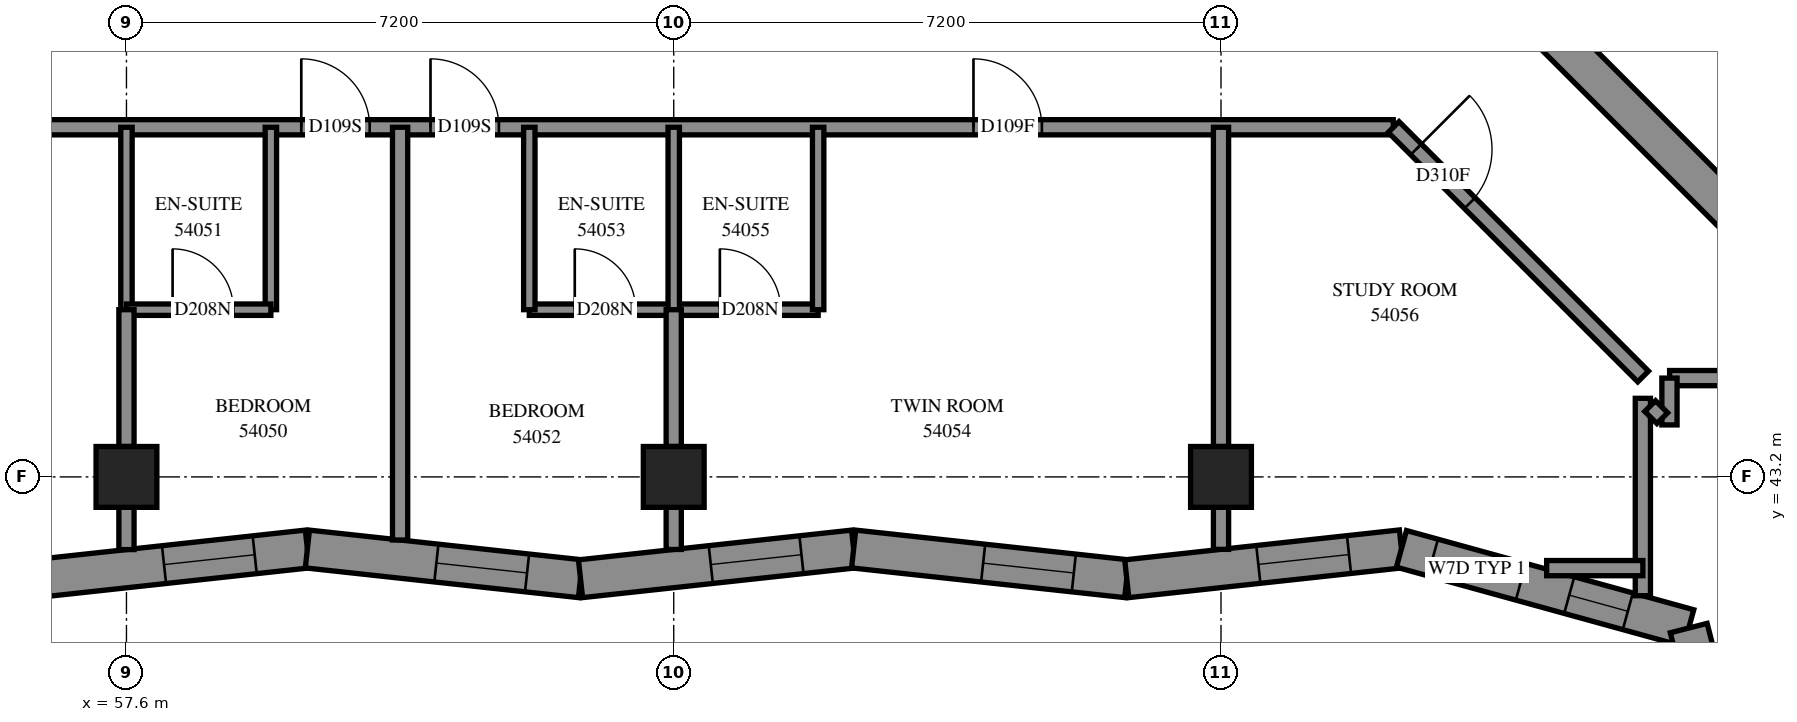
"""IFC4 building model, lengths in metres.
Left out: names, types, materials, properties, quantities, classifications, styles, units other than length and angle.
Written with IfcOpenShell. Run it as: python <this file> out.ifc"""

import sys

from ifc_helpers import new_model, si_unit, direction, frame, frame_2d, origin, origin_2d, place, context, subcontext, project, spatial, polyline, rectangle, outline, extrude, element, fill, save


model = new_model("IFC4")
c1 = context("Model", 3, precision=1e-05, world=origin(), true_north=direction((0.0, 1.0)))
c2 = subcontext(c1, "Body", "Model", "MODEL_VIEW")
j1 = project(units=[si_unit("LENGTHUNIT", "METRE"), si_unit("PLANEANGLEUNIT", "RADIAN")], contexts=[c1])
p1 = place(None, origin())
s1 = spatial("IfcSite", under=j1, at=p1, CompositionType="ELEMENT")
p2 = place(p1, origin())
s2 = spatial("IfcBuilding", under=s1, at=p2, CompositionType="ELEMENT")
p3 = place(p2, frame((0.0, 0.0, 199.8)))
s3 = spatial("IfcBuildingStorey", under=s2, at=p3, CompositionType="ELEMENT", Elevation=199.8)
for number, where, z_axis, x_axis in (
    (1, (57.6, 43.2, 0.0), (0.0, 0.0, 1.0), (1.0, 0.0, 0.0)),
    (2, (64.8, 43.2, 0.0), (0.0, 0.0, 1.0), (1.0, 0.0, 0.0)),
    (3, (72.0, 43.2, 0.0), (0.0, 0.0, 1.0), (1.0, 0.0, 0.0)),
):
    element("IfcColumn", number, at=place(p3, frame(where, z_axis=z_axis, x_axis=x_axis)), inside=s3, PredefinedType="COLUMN", context=c2, shape_type="SweptSolid", body=[
        extrude(rectangle(XDim=0.8, YDim=0.8, at=origin_2d()), origin(), (0.0, 0.0, 1.0), 3.1),
    ])
p4 = place(p3, frame((76.124, 49.267, -0.3), z_axis=(0.0, 0.0, 1.0), x_axis=(0.7071067812, -0.7071067812, 0.0)))
e4 = element("IfcWall", 4, at=p4, inside=s3, PredefinedType="SHEAR", context=c2, shape_type="SweptSolid", body=[
    extrude(rectangle(XDim=15.4, YDim=0.5, at=frame_2d((7.7, 0.0))), origin(), (0.0, 0.0, 1.0), 2.7),
])
p5 = place(p3, frame((56.387, 41.861, 0.0), z_axis=(0.0, 0.0, 1.0), x_axis=(0.994132181, 0.1081721163, 0.0)))
e5 = element("IfcWall", 5, at=p5, inside=s3, PredefinedType="SOLIDWALL", context=c2, shape_type="SweptSolid", body=[
    extrude(outline(polyline([(-0.027, -0.25), (3.587, -0.25), (3.642, 0.25), (0.027, 0.25), (-0.027, -0.25)])), origin(), (0.0, 0.0, 1.0), 3.1),
])
p6 = place(p5, frame((1.718, 0.0, 0.45)))
e6 = element("IfcOpeningElement", 6, at=p6, cuts=e5, PredefinedType="OPENING", context=c2, shape_type="SweptSolid", body=[
    extrude(rectangle(XDim=1.2, YDim=2.5, at=frame_2d((0.6, 1.25))), frame((0.0, 0.26, 0.0), z_axis=(0.0, -1.0, 0.0), x_axis=(1.0, 0.0, 0.0)), (0.0, 0.0, 1.0), 0.52),
])
p7 = place(p3, frame((59.98, 42.252, 0.0), z_axis=(0.0, 0.0, 1.0), x_axis=(0.994132181, -0.1081721163, 0.0)))
e7 = element("IfcWall", 7, at=p7, inside=s3, PredefinedType="SOLIDWALL", context=c2, shape_type="SweptSolid", body=[
    extrude(outline(polyline([(0.027, -0.25), (3.642, -0.25), (3.587, 0.25), (-0.027, 0.25), (0.027, -0.25)])), origin(), (0.0, 0.0, 1.0), 3.1),
])
p8 = place(p7, frame((1.707, 0.0, 0.45)))
e8 = element("IfcOpeningElement", 8, at=p8, cuts=e7, PredefinedType="OPENING", context=c2, shape_type="SweptSolid", body=[
    extrude(rectangle(XDim=1.2, YDim=2.5, at=frame_2d((0.6, 1.25))), frame((0.0, 0.26, 0.0), z_axis=(0.0, -1.0, 0.0), x_axis=(1.0, 0.0, 0.0)), (0.0, 0.0, 1.0), 0.52),
])
p9 = place(p3, frame((63.574, 41.861, 0.0), z_axis=(0.0, 0.0, 1.0), x_axis=(0.9941318572, 0.1081750915, 0.0)))
e9 = element("IfcWall", 9, at=p9, inside=s3, PredefinedType="SOLIDWALL", context=c2, shape_type="SweptSolid", body=[
    extrude(outline(polyline([(-0.027, -0.25), (3.587, -0.25), (3.642, 0.25), (0.027, 0.25), (-0.027, -0.25)])), origin(), (0.0, 0.0, 1.0), 3.1),
])
p10 = place(p9, frame((1.724, 0.0, 0.45)))
e10 = element("IfcOpeningElement", 10, at=p10, cuts=e9, PredefinedType="OPENING", context=c2, shape_type="SweptSolid", body=[
    extrude(rectangle(XDim=1.2, YDim=2.5, at=frame_2d((0.6, 1.25))), frame((0.0, 0.26, 0.0), z_axis=(0.0, -1.0, 0.0), x_axis=(1.0, 0.0, 0.0)), (0.0, 0.0, 1.0), 0.52),
])
p11 = place(p3, frame((67.167, 42.252, 0.0), z_axis=(0.0, 0.0, 1.0), x_axis=(0.994132181, -0.1081721163, 0.0)))
e11 = element("IfcWall", 11, at=p11, inside=s3, PredefinedType="SOLIDWALL", context=c2, shape_type="SweptSolid", body=[
    extrude(outline(polyline([(0.027, -0.25), (3.642, -0.25), (3.587, 0.25), (-0.027, 0.25), (0.027, -0.25)])), origin(), (0.0, 0.0, 1.0), 3.1),
])
p12 = place(p11, frame((1.714, 0.0, 0.45)))
e12 = element("IfcOpeningElement", 12, at=p12, cuts=e11, PredefinedType="OPENING", context=c2, shape_type="SweptSolid", body=[
    extrude(rectangle(XDim=1.2, YDim=2.5, at=frame_2d((0.6, 1.25))), frame((0.0, 0.26, 0.0), z_axis=(0.0, -1.0, 0.0), x_axis=(1.0, 0.0, 0.0)), (0.0, 0.0, 1.0), 0.52),
])
p13 = place(p3, frame((70.76, 41.861, 0.0), z_axis=(0.0, 0.0, 1.0), x_axis=(0.9941327648, 0.1081667505, 0.0)))
e13 = element("IfcWall", 13, at=p13, inside=s3, PredefinedType="SOLIDWALL", context=c2, shape_type="SweptSolid", body=[
    extrude(outline(polyline([(-0.027, -0.25), (3.587, -0.25), (3.683, 0.25), (0.027, 0.25), (-0.027, -0.25)])), origin(), (0.0, 0.0, 1.0), 3.1),
])
p14 = place(p13, frame((1.741, 0.0, 0.45)))
e14 = element("IfcOpeningElement", 14, at=p14, cuts=e13, PredefinedType="OPENING", context=c2, shape_type="SweptSolid", body=[
    extrude(rectangle(XDim=1.2, YDim=2.5, at=frame_2d((0.6, 1.25))), frame((0.0, 0.26, 0.0), z_axis=(0.0, -1.0, 0.0), x_axis=(1.0, 0.0, 0.0)), (0.0, 0.0, 1.0), 0.52),
])
p15 = place(p3, frame((74.374, 42.254, 0.0), z_axis=(0.0, 0.0, 1.0), x_axis=(0.9640099783, -0.2658660599, 0.0)))
e15 = element("IfcWall", 15, at=p15, inside=s3, PredefinedType="SOLIDWALL", context=c2, shape_type="SweptSolid", body=[
    extrude(outline(polyline([(0.048, -0.25), (3.775, -0.25), (4.066, 0.25), (-0.048, 0.25), (0.048, -0.25)])), origin(), (0.0, 0.0, 1.0), 3.1),
])
p16 = place(p15, frame((0.429, 0.0, 0.5)))
e16 = element("IfcOpeningElement", 16, at=p16, cuts=e15, PredefinedType="OPENING", context=c2, shape_type="SweptSolid", body=[
    extrude(rectangle(XDim=1.2, YDim=2.45, at=frame_2d((0.6, 1.225))), frame((0.0, 0.26, 0.0), z_axis=(0.0, -1.0, 0.0), x_axis=(1.0, 0.0, 0.0)), (0.0, 0.0, 1.0), 0.52),
])
p17 = place(p15, frame((2.29, 0.0, 0.45)))
e17 = element("IfcOpeningElement", 17, at=p17, cuts=e15, PredefinedType="OPENING", context=c2, shape_type="SweptSolid", body=[
    extrude(rectangle(XDim=0.8, YDim=2.5, at=frame_2d((0.4, 1.25))), frame((0.0, 0.26, 0.0), z_axis=(0.0, -1.0, 0.0), x_axis=(1.0, 0.0, 0.0)), (0.0, 0.0, 1.0), 0.52),
])
p18 = place(p3, frame((78.153, 41.211, 0.0), z_axis=(0.0, 0.0, 1.0), x_axis=(0.2470941047, -0.9689914878, 0.0)))
e18 = element("IfcWall", 18, at=p18, inside=s3, PredefinedType="SOLIDWALL", context=c2, shape_type="SweptSolid", body=[
    extrude(outline(polyline([(0.145, -0.25), (4.847, -0.25), (4.562, 0.25), (-0.145, 0.25), (0.145, -0.25)])), origin(), (0.0, 0.0, 1.0), 3.1),
])
p19 = place(p18, frame((0.631, 0.0, 0.45)))
e19 = element("IfcOpeningElement", 19, at=p19, cuts=e18, PredefinedType="OPENING", context=c2, shape_type="SweptSolid", body=[
    extrude(rectangle(XDim=1.2, YDim=2.5, at=frame_2d((0.6, 1.25))), frame((0.0, 0.26, 0.0), z_axis=(0.0, -1.0, 0.0), x_axis=(1.0, 0.0, 0.0)), (0.0, 0.0, 1.0), 0.52),
])
p20 = place(p18, frame((2.413, 0.0, 0.45)))
e20 = element("IfcOpeningElement", 20, at=p20, cuts=e18, PredefinedType="OPENING", context=c2, shape_type="SweptSolid", body=[
    extrude(rectangle(XDim=1.2, YDim=2.5, at=frame_2d((0.6, 1.25))), frame((0.0, 0.26, 0.0), z_axis=(0.0, -1.0, 0.0), x_axis=(1.0, 0.0, 0.0)), (0.0, 0.0, 1.0), 0.52),
])
p21 = place(p3, frame((55.0, 47.8, 0.0), z_axis=(0.0, 0.0, 1.0), x_axis=(1.0, 0.0, 0.0)))
e21 = element("IfcWall", 21, at=p21, inside=s3, PredefinedType="PARTITIONING", context=c2, shape_type="SweptSolid", body=[
    extrude(rectangle(XDim=19.266, YDim=0.2, at=frame_2d((9.633, 0.0))), origin(), (0.0, 0.0, 1.0), 3.1),
])
p22 = place(p21, frame((4.9, 0.0, 0.0)))
e22 = element("IfcOpeningElement", 22, at=p22, cuts=e21, PredefinedType="OPENING", context=c2, shape_type="SweptSolid", body=[
    extrude(rectangle(XDim=0.9, YDim=2.1, at=frame_2d((0.45, 1.05))), frame((0.0, 0.11, 0.0), z_axis=(0.0, -1.0, 0.0), x_axis=(1.0, 0.0, 0.0)), (0.0, 0.0, 1.0), 0.22),
])
p23 = place(p21, frame((6.6, 0.0, 0.0)))
e23 = element("IfcOpeningElement", 23, at=p23, cuts=e21, PredefinedType="OPENING", context=c2, shape_type="SweptSolid", body=[
    extrude(rectangle(XDim=0.9, YDim=2.1, at=frame_2d((0.45, 1.05))), frame((0.0, 0.11, 0.0), z_axis=(0.0, -1.0, 0.0), x_axis=(1.0, 0.0, 0.0)), (0.0, 0.0, 1.0), 0.22),
])
p24 = place(p21, frame((13.743, 0.0, 0.0)))
e24 = element("IfcOpeningElement", 24, at=p24, cuts=e21, PredefinedType="OPENING", context=c2, shape_type="SweptSolid", body=[
    extrude(rectangle(XDim=0.9, YDim=2.1, at=frame_2d((0.45, 1.05))), frame((0.0, 0.11, 0.0), z_axis=(0.0, -1.0, 0.0), x_axis=(1.0, 0.0, 0.0)), (0.0, 0.0, 1.0), 0.22),
])
p25 = place(p3, frame((61.2, 42.37, 0.0), z_axis=(0.0, 0.0, 1.0), x_axis=(0.0, 1.0, 0.0)))
e25 = element("IfcWall", 25, at=p25, inside=s3, PredefinedType="PARTITIONING", context=c2, shape_type="SweptSolid", body=[
    extrude(rectangle(XDim=5.43, YDim=0.2, at=frame_2d((2.715, 0.0))), origin(), (0.0, 0.0, 1.0), 3.1),
])
p26 = place(p3, frame((74.272, 47.803, 0.0), z_axis=(0.0, 0.0, 1.0), x_axis=(0.7071067812, -0.7071067812, 0.0)))
e26 = element("IfcWall", 26, at=p26, inside=s3, PredefinedType="PARTITIONING", context=c2, shape_type="SweptSolid", body=[
    extrude(rectangle(XDim=4.641, YDim=0.2, at=frame_2d((2.321, 0.0))), origin(), (0.0, 0.0, 1.0), 3.1),
])
p27 = place(p26, frame((0.416, 0.0, 0.0)))
e27 = element("IfcOpeningElement", 27, at=p27, cuts=e26, PredefinedType="OPENING", context=c2, shape_type="SweptSolid", body=[
    extrude(rectangle(XDim=1.0, YDim=2.1, at=frame_2d((0.5, 1.05))), frame((0.0, 0.11, 0.0), z_axis=(0.0, -1.0, 0.0), x_axis=(1.0, 0.0, 0.0)), (0.0, 0.0, 1.0), 0.22),
])
p28 = place(p3, frame((72.0, 43.6, 0.0), z_axis=(0.0, 0.0, 1.0), x_axis=(0.0, 1.0, 0.0)))
e28 = element("IfcWall", 28, at=p28, inside=s3, PredefinedType="PARTITIONING", context=c2, shape_type="SweptSolid", body=[
    extrude(rectangle(XDim=4.2, YDim=0.2, at=frame_2d((2.1, 0.0))), origin(), (0.0, 0.0, 1.0), 3.1),
])
p29 = place(p3, frame((62.9, 45.4, 0.0), z_axis=(0.0, 0.0, 1.0), x_axis=(1.0, 0.0, 0.0)))
e29 = element("IfcWall", 29, at=p29, inside=s3, PredefinedType="PARTITIONING", context=c2, shape_type="SweptSolid", body=[
    extrude(rectangle(XDim=3.8, YDim=0.15, at=frame_2d((1.9, 0.0))), origin(), (0.0, 0.0, 1.0), 3.1),
])
p30 = place(p29, frame((0.598, 0.0, 0.0)))
e30 = element("IfcOpeningElement", 30, at=p30, cuts=e29, PredefinedType="OPENING", context=c2, shape_type="SweptSolid", body=[
    extrude(rectangle(XDim=0.8, YDim=2.1, at=frame_2d((0.4, 1.05))), frame((0.0, 0.085, 0.0), z_axis=(0.0, -1.0, 0.0), x_axis=(1.0, 0.0, 0.0)), (0.0, 0.0, 1.0), 0.17),
])
p31 = place(p29, frame((2.507, 0.0, 0.0)))
e31 = element("IfcOpeningElement", 31, at=p31, cuts=e29, PredefinedType="OPENING", context=c2, shape_type="SweptSolid", body=[
    extrude(rectangle(XDim=0.8, YDim=2.1, at=frame_2d((0.4, 1.05))), frame((0.0, 0.085, 0.0), z_axis=(0.0, -1.0, 0.0), x_axis=(1.0, 0.0, 0.0)), (0.0, 0.0, 1.0), 0.17),
])
p32 = place(p3, frame((77.902, 44.5, 0.0), z_axis=(0.0, 0.0, 1.0), x_axis=(1.0, 0.0, 0.0)))
e32 = element("IfcWall", 32, at=p32, inside=s3, PredefinedType="PARTITIONING", context=c2, shape_type="SweptSolid", body=[
    extrude(rectangle(XDim=2.522, YDim=0.2, at=frame_2d((1.261, 0.0))), origin(), (0.0, 0.0, 1.0), 3.1),
])
for number, where, z_axis, x_axis in (
    (33, (59.5, 45.4, 0.0), (0.0, 0.0, 1.0), (0.0, 1.0, 0.0)),
    (34, (57.6, 45.4, 0.0), (0.0, 0.0, 1.0), (0.0, 1.0, 0.0)),
    (35, (62.9, 45.4, 0.0), (0.0, 0.0, 1.0), (0.0, 1.0, 0.0)),
    (36, (66.7, 45.4, 0.0), (0.0, 0.0, 1.0), (0.0, 1.0, 0.0)),
    (37, (64.8, 45.4, 0.0), (0.0, 0.0, 1.0), (0.0, 1.0, 0.0)),
):
    element("IfcWall", number, at=place(p3, frame(where, z_axis=z_axis, x_axis=x_axis)), inside=s3, PredefinedType="PARTITIONING", context=c2, shape_type="SweptSolid", body=[
        extrude(rectangle(XDim=2.4, YDim=0.15, at=frame_2d((1.2, 0.0))), origin(), (0.0, 0.0, 1.0), 3.1),
    ])
p33 = place(p3, frame((77.55, 41.637, 0.0), z_axis=(0.0, 0.0, 1.0), x_axis=(0.0, 1.0, 0.0)))
e38 = element("IfcWall", 38, at=p33, inside=s3, PredefinedType="PARTITIONING", context=c2, shape_type="SweptSolid", body=[
    extrude(rectangle(XDim=2.597, YDim=0.2, at=frame_2d((1.298, 0.0))), origin(), (0.0, 0.0, 1.0), 3.1),
])
p34 = place(p3, frame((57.6, 45.4, 0.0), z_axis=(0.0, 0.0, 1.0), x_axis=(1.0, 0.0, 0.0)))
e39 = element("IfcWall", 39, at=p34, inside=s3, PredefinedType="PARTITIONING", context=c2, shape_type="SweptSolid", body=[
    extrude(rectangle(XDim=1.9, YDim=0.15, at=frame_2d((0.95, 0.0))), origin(), (0.0, 0.0, 1.0), 3.1),
])
p35 = place(p34, frame((0.607, 0.0, 0.0)))
e40 = element("IfcOpeningElement", 40, at=p35, cuts=e39, PredefinedType="OPENING", context=c2, shape_type="SweptSolid", body=[
    extrude(rectangle(XDim=0.8, YDim=2.1, at=frame_2d((0.4, 1.05))), frame((0.0, 0.085, 0.0), z_axis=(0.0, -1.0, 0.0), x_axis=(1.0, 0.0, 0.0)), (0.0, 0.0, 1.0), 0.17),
])
for number, where, z_axis, x_axis in (
    (41, (57.6, 43.6, 0.0), (0.0, 0.0, 1.0), (0.0, 1.0, 0.0)),
    (42, (64.8, 43.6, 0.0), (0.0, 0.0, 1.0), (0.0, 1.0, 0.0)),
):
    element("IfcWall", number, at=place(p3, frame(where, z_axis=z_axis, x_axis=x_axis)), inside=s3, PredefinedType="PARTITIONING", context=c2, shape_type="SweptSolid", body=[
        extrude(rectangle(XDim=1.8, YDim=0.2, at=frame_2d((0.9, 0.0))), origin(), (0.0, 0.0, 1.0), 3.1),
    ])
p36 = place(p3, frame((76.284, 42.0, 0.0), z_axis=(0.0, 0.0, 1.0), x_axis=(1.0, 0.0, 0.0)))
e43 = element("IfcWall", 43, at=p36, inside=s3, PredefinedType="PARTITIONING", context=c2, shape_type="SweptSolid", body=[
    extrude(rectangle(XDim=1.266, YDim=0.2, at=frame_2d((0.633, 0.0))), origin(), (0.0, 0.0, 1.0), 3.1),
])
p37 = place(p3, frame((78.522, 40.778, 0.0), z_axis=(0.0, 0.0, 1.0), x_axis=(0.7081564071, 0.7060555949, 0.0)))
e44 = element("IfcWall", 44, at=p37, inside=s3, PredefinedType="PARTITIONING", context=c2, shape_type="SweptSolid", body=[
    extrude(rectangle(XDim=1.095, YDim=0.2, at=frame_2d((0.547, 0.0))), origin(), (0.0, 0.0, 1.0), 3.1),
])
p38 = place(p3, frame((77.9, 43.884, 0.0), z_axis=(0.0, 0.0, 1.0), x_axis=(0.0, 1.0, 0.0)))
e45 = element("IfcWall", 45, at=p38, inside=s3, PredefinedType="PARTITIONING", context=c2, shape_type="SweptSolid", body=[
    extrude(rectangle(XDim=0.616, YDim=0.2, at=frame_2d((0.308, 0.0))), origin(), (0.0, 0.0, 1.0), 3.1),
])
p39 = place(p3, frame((57.6, 42.244, 0.0), z_axis=(0.0, 0.0, 1.0), x_axis=(0.0, 1.0, 0.0)))
e46 = element("IfcWall", 46, at=p39, inside=s3, PredefinedType="PARTITIONING", context=c2, shape_type="SweptSolid", body=[
    extrude(rectangle(XDim=0.556, YDim=0.2, at=frame_2d((0.278, 0.0))), origin(), (0.0, 0.0, 1.0), 3.1),
])
p40 = place(p3, frame((64.8, 42.245, 0.0), z_axis=(0.0, 0.0, 1.0), x_axis=(0.0, 1.0, 0.0)))
e47 = element("IfcWall", 47, at=p40, inside=s3, PredefinedType="PARTITIONING", context=c2, shape_type="SweptSolid", body=[
    extrude(rectangle(XDim=0.555, YDim=0.2, at=frame_2d((0.277, 0.0))), origin(), (0.0, 0.0, 1.0), 3.1),
])
p41 = place(p3, frame((72.0, 42.247, 0.0), z_axis=(0.0, 0.0, 1.0), x_axis=(0.0, 1.0, 0.0)))
e48 = element("IfcWall", 48, at=p41, inside=s3, PredefinedType="PARTITIONING", context=c2, shape_type="SweptSolid", body=[
    extrude(rectangle(XDim=0.553, YDim=0.2, at=frame_2d((0.277, 0.0))), origin(), (0.0, 0.0, 1.0), 3.1),
])
p42 = place(p3, frame((77.646, 44.132, 0.0), z_axis=(0.0, 0.0, 1.0), x_axis=(0.7068844555, -0.707329037, 0.0)))
e49 = element("IfcWall", 49, at=p42, inside=s3, PredefinedType="PARTITIONING", context=c2, shape_type="SweptSolid", body=[
    extrude(rectangle(XDim=0.225, YDim=0.2, at=frame_2d((0.112, 0.0))), origin(), (0.0, 0.0, 1.0), 3.1),
])
p43 = place(p6, origin())
e50 = element("IfcWindow", 50, at=p43, inside=s3, PartitioningType="SINGLE_PANEL", PredefinedType="WINDOW", context=c2, shape_type="SweptSolid", body=[
    extrude(rectangle(XDim=1.2, YDim=2.5, at=frame_2d((0.6, 1.25))), frame((0.0, 0.18, 0.0), z_axis=(0.0, -1.0, 0.0), x_axis=(1.0, 0.0, 0.0)), (0.0, 0.0, 1.0), 0.06),
])
fill(e6, e50)
p44 = place(p8, origin())
e51 = element("IfcWindow", 51, at=p44, inside=s3, PartitioningType="SINGLE_PANEL", PredefinedType="WINDOW", context=c2, shape_type="SweptSolid", body=[
    extrude(rectangle(XDim=1.2, YDim=2.5, at=frame_2d((0.6, 1.25))), frame((0.0, 0.18, 0.0), z_axis=(0.0, -1.0, 0.0), x_axis=(1.0, 0.0, 0.0)), (0.0, 0.0, 1.0), 0.06),
])
fill(e8, e51)
p45 = place(p10, origin())
e52 = element("IfcWindow", 52, at=p45, inside=s3, PartitioningType="SINGLE_PANEL", PredefinedType="WINDOW", context=c2, shape_type="SweptSolid", body=[
    extrude(rectangle(XDim=1.2, YDim=2.5, at=frame_2d((0.6, 1.25))), frame((0.0, 0.18, 0.0), z_axis=(0.0, -1.0, 0.0), x_axis=(1.0, 0.0, 0.0)), (0.0, 0.0, 1.0), 0.06),
])
fill(e10, e52)
p46 = place(p12, origin())
e53 = element("IfcWindow", 53, at=p46, inside=s3, PartitioningType="SINGLE_PANEL", PredefinedType="WINDOW", context=c2, shape_type="SweptSolid", body=[
    extrude(rectangle(XDim=1.2, YDim=2.5, at=frame_2d((0.6, 1.25))), frame((0.0, 0.18, 0.0), z_axis=(0.0, -1.0, 0.0), x_axis=(1.0, 0.0, 0.0)), (0.0, 0.0, 1.0), 0.06),
])
fill(e12, e53)
p47 = place(p14, origin())
e54 = element("IfcWindow", 54, at=p47, inside=s3, PartitioningType="SINGLE_PANEL", PredefinedType="WINDOW", context=c2, shape_type="SweptSolid", body=[
    extrude(rectangle(XDim=1.2, YDim=2.5, at=frame_2d((0.6, 1.25))), frame((0.0, 0.18, 0.0), z_axis=(0.0, -1.0, 0.0), x_axis=(1.0, 0.0, 0.0)), (0.0, 0.0, 1.0), 0.06),
])
fill(e14, e54)
p48 = place(p22, origin())
e55 = element("IfcDoor", 55, at=p48, inside=s3, OperationType="SINGLE_SWING_LEFT", PredefinedType="DOOR", context=c2, shape_type="SweptSolid", body=[
    extrude(rectangle(XDim=0.9, YDim=2.1, at=frame_2d((0.45, 1.05))), frame((0.0, 0.025, 0.0), z_axis=(0.0, -1.0, 0.0), x_axis=(1.0, 0.0, 0.0)), (0.0, 0.0, 1.0), 0.05),
])
fill(e22, e55)
p49 = place(p35, origin())
e56 = element("IfcDoor", 56, at=p49, inside=s3, OperationType="SINGLE_SWING_RIGHT", PredefinedType="DOOR", context=c2, shape_type="SweptSolid", body=[
    extrude(rectangle(XDim=0.8, YDim=2.1, at=frame_2d((0.4, 1.05))), frame((0.0, 0.025, 0.0), z_axis=(0.0, -1.0, 0.0), x_axis=(1.0, 0.0, 0.0)), (0.0, 0.0, 1.0), 0.05),
])
fill(e40, e56)
p50 = place(p23, origin())
e57 = element("IfcDoor", 57, at=p50, inside=s3, OperationType="SINGLE_SWING_RIGHT", PredefinedType="DOOR", context=c2, shape_type="SweptSolid", body=[
    extrude(rectangle(XDim=0.9, YDim=2.1, at=frame_2d((0.45, 1.05))), frame((0.0, 0.025, 0.0), z_axis=(0.0, -1.0, 0.0), x_axis=(1.0, 0.0, 0.0)), (0.0, 0.0, 1.0), 0.05),
])
fill(e23, e57)
p51 = place(p30, origin())
e58 = element("IfcDoor", 58, at=p51, inside=s3, OperationType="SINGLE_SWING_RIGHT", PredefinedType="DOOR", context=c2, shape_type="SweptSolid", body=[
    extrude(rectangle(XDim=0.8, YDim=2.1, at=frame_2d((0.4, 1.05))), frame((0.0, 0.025, 0.0), z_axis=(0.0, -1.0, 0.0), x_axis=(1.0, 0.0, 0.0)), (0.0, 0.0, 1.0), 0.05),
])
fill(e30, e58)
p52 = place(p24, origin())
e59 = element("IfcDoor", 59, at=p52, inside=s3, OperationType="SINGLE_SWING_LEFT", PredefinedType="DOOR", context=c2, shape_type="SweptSolid", body=[
    extrude(rectangle(XDim=0.9, YDim=2.1, at=frame_2d((0.45, 1.05))), frame((0.0, 0.025, 0.0), z_axis=(0.0, -1.0, 0.0), x_axis=(1.0, 0.0, 0.0)), (0.0, 0.0, 1.0), 0.05),
])
fill(e24, e59)
p53 = place(p31, origin())
e60 = element("IfcDoor", 60, at=p53, inside=s3, OperationType="SINGLE_SWING_RIGHT", PredefinedType="DOOR", context=c2, shape_type="SweptSolid", body=[
    extrude(rectangle(XDim=0.8, YDim=2.1, at=frame_2d((0.4, 1.05))), frame((0.0, 0.025, 0.0), z_axis=(0.0, -1.0, 0.0), x_axis=(1.0, 0.0, 0.0)), (0.0, 0.0, 1.0), 0.05),
])
fill(e31, e60)
p54 = place(p27, origin())
e61 = element("IfcDoor", 61, at=p54, inside=s3, OperationType="SINGLE_SWING_LEFT", PredefinedType="DOOR", context=c2, shape_type="SweptSolid", body=[
    extrude(rectangle(XDim=1.0, YDim=2.1, at=frame_2d((0.5, 1.05))), frame((0.0, 0.025, 0.0), z_axis=(0.0, -1.0, 0.0), x_axis=(1.0, 0.0, 0.0)), (0.0, 0.0, 1.0), 0.05),
])
fill(e27, e61)
p55 = place(p16, origin())
e62 = element("IfcWindow", 62, at=p55, inside=s3, PartitioningType="SINGLE_PANEL", PredefinedType="WINDOW", context=c2, shape_type="SweptSolid", body=[
    extrude(rectangle(XDim=1.2, YDim=2.45, at=frame_2d((0.6, 1.225))), frame((0.0, 0.18, 0.0), z_axis=(0.0, -1.0, 0.0), x_axis=(1.0, 0.0, 0.0)), (0.0, 0.0, 1.0), 0.06),
])
fill(e16, e62)
p56 = place(p17, origin())
e63 = element("IfcWindow", 63, at=p56, inside=s3, PartitioningType="SINGLE_PANEL", PredefinedType="WINDOW", context=c2, shape_type="SweptSolid", body=[
    extrude(rectangle(XDim=0.8, YDim=2.5, at=frame_2d((0.4, 1.25))), frame((0.0, 0.18, 0.0), z_axis=(0.0, -1.0, 0.0), x_axis=(1.0, 0.0, 0.0)), (0.0, 0.0, 1.0), 0.06),
])
fill(e17, e63)
save(model, sys.argv[1])
